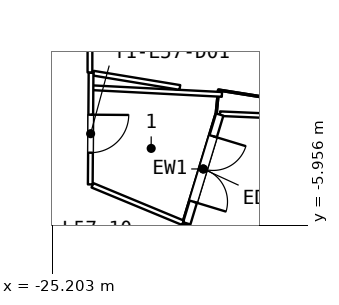
"""IFC4 building model, lengths in metres.
Left out: names, types, materials, properties, quantities, classifications, styles, units other than length and angle.
Written with IfcOpenShell. Run it as: python <this file> out.ifc"""

import sys

from ifc_helpers import new_model, si_unit, direction, frame, frame_2d, origin, place, context, subcontext, project, spatial, rectangle, extrude, element, fill, save


model = new_model("IFC4")
c1 = context("Model", 3, precision=1e-05, world=origin(), true_north=direction((0.0, 1.0)))
c2 = subcontext(c1, "Body", "Model", "MODEL_VIEW")
j1 = project(units=[si_unit("LENGTHUNIT", "METRE"), si_unit("PLANEANGLEUNIT", "RADIAN")], contexts=[c1])
p1 = place(None, origin())
s1 = spatial("IfcSite", under=j1, at=p1, CompositionType="ELEMENT")
p2 = place(p1, origin())
s2 = spatial("IfcBuilding", under=s1, at=p2, CompositionType="ELEMENT")
p3 = place(p2, frame((0.0, 0.0, 240.6)))
s3 = spatial("IfcBuildingStorey", under=s2, at=p3, CompositionType="ELEMENT", Elevation=240.6)
p4 = place(p3, frame((-20.795, -3.05, 0.0), z_axis=(0.0, 0.0, 1.0), x_axis=(-0.290222640036, -0.956959152321, 0.0)))
e1 = element("IfcWall", 1, at=p4, inside=s3, PredefinedType="SOLIDWALL", context=c2, shape_type="SweptSolid", body=[
    extrude(rectangle(XDim=2.99, YDim=0.2, at=frame_2d((1.495, 0.0))), origin(), (0.0, 0.0, 1.0), 7.5),
])
p5 = place(p4, frame((0.595, 0.0, 0.0)))
e2 = element("IfcOpeningElement", 2, at=p5, cuts=e1, PredefinedType="OPENING", context=c2, shape_type="SweptSolid", body=[
    extrude(rectangle(XDim=1.8, YDim=2.4, at=frame_2d((0.9, 1.2))), frame((0.0, 0.11, 0.0), z_axis=(0.0, -1.0, 0.0), x_axis=(1.0, 0.0, 0.0)), (0.0, 0.0, 1.0), 0.22),
])
p6 = place(p3, frame((-21.763, -5.897, 0.0), z_axis=(0.0, 0.0, 1.0), x_axis=(-0.923865536241, 0.382717220603, 0.0)))
e3 = element("IfcWall", 3, at=p6, inside=s3, PredefinedType="PARTITIONING", context=c2, shape_type="SweptSolid", body=[
    extrude(rectangle(XDim=2.576, YDim=0.125, at=frame_2d((1.288, 0.0))), origin(), (0.0, 0.0, 1.0), 2.4),
])
p7 = place(p3, frame((-20.738, -2.519, 0.0), z_axis=(0.0, 0.0, 1.0), x_axis=(-0.99869028618, 0.051163583637, 0.0)))
e4 = element("IfcWall", 4, at=p7, inside=s3, PredefinedType="PARTITIONING", context=c2, shape_type="SweptSolid", body=[
    extrude(rectangle(XDim=3.417, YDim=0.125, at=frame_2d((1.708, 0.0))), origin(), (0.0, 0.0, 1.0), 3.6),
])
p8 = place(p3, frame((-21.844, -2.336, 0.0), z_axis=(0.0, 0.0, 1.0), x_axis=(-0.986650274998, 0.162853415212, 0.0)))
e5 = element("IfcWall", 5, at=p8, inside=s3, PredefinedType="PARTITIONING", context=c2, shape_type="SweptSolid", body=[
    extrude(rectangle(XDim=2.306, YDim=0.125, at=frame_2d((1.153, 0.0))), origin(), (0.0, 0.0, 1.0), 3.6),
])
p9 = place(p3, frame((-24.181, -1.95, 0.0), z_axis=(0.0, 0.0, 1.0), x_axis=(-0.007066667577, -0.999975030793, 0.0)))
e6 = element("IfcWall", 6, at=p9, inside=s3, PredefinedType="PARTITIONING", context=c2, shape_type="SweptSolid", body=[
    extrude(rectangle(XDim=2.937, YDim=0.125, at=frame_2d((1.468, 0.0))), origin(), (0.0, 0.0, 1.0), 2.4),
])
p10 = place(p9, frame((1.102, 0.0, 0.0)))
e7 = element("IfcOpeningElement", 7, at=p10, cuts=e6, PredefinedType="OPENING", context=c2, shape_type="SweptSolid", body=[
    extrude(rectangle(XDim=1.0, YDim=2.1, at=frame_2d((0.5, 1.05))), frame((0.0, 0.073, 0.0), z_axis=(0.0, -1.0, 0.0), x_axis=(1.0, 0.0, 0.0)), (0.0, 0.0, 1.0), 0.145),
])
p11 = place(p3, frame((-24.201, 4.887, 0.0), z_axis=(0.0, 0.0, 1.0), x_axis=(-0.001358888747, -0.99999907671, 0.0)))
e8 = element("IfcWall", 8, at=p11, inside=s3, PredefinedType="PARTITIONING", context=c2, shape_type="SweptSolid", body=[
    extrude(rectangle(XDim=6.827, YDim=0.125, at=frame_2d((3.414, 0.0))), origin(), (0.0, 0.0, 1.0), 2.4),
])
p12 = place(p11, frame((2.614, 0.0, 0.0)))
e9 = element("IfcOpeningElement", 9, at=p12, cuts=e8, PredefinedType="OPENING", context=c2, shape_type="SweptSolid", body=[
    extrude(rectangle(XDim=1.8, YDim=2.1, at=frame_2d((0.9, 1.05))), frame((0.0, 0.073, 0.0), z_axis=(0.0, -1.0, 0.0), x_axis=(1.0, 0.0, 0.0)), (0.0, 0.0, 1.0), 0.145),
])
p13 = place(p5, origin())
e10 = element("IfcDoor", 10, at=p13, inside=s3, OperationType="SINGLE_SWING_LEFT", PredefinedType="DOOR", context=c2, shape_type="SweptSolid", body=[
    extrude(rectangle(XDim=1.8, YDim=2.4, at=frame_2d((0.9, 1.2))), frame((0.0, 0.025, 0.0), z_axis=(0.0, -1.0, 0.0), x_axis=(1.0, 0.0, 0.0)), (0.0, 0.0, 1.0), 0.05),
])
fill(e2, e10)
p14 = place(p10, origin())
e11 = element("IfcDoor", 11, at=p14, inside=s3, OperationType="SINGLE_SWING_LEFT", PredefinedType="DOOR", context=c2, shape_type="SweptSolid", body=[
    extrude(rectangle(XDim=1.0, YDim=2.1, at=frame_2d((0.5, 1.05))), frame((0.0, 0.025, 0.0), z_axis=(0.0, -1.0, 0.0), x_axis=(1.0, 0.0, 0.0)), (0.0, 0.0, 1.0), 0.05),
])
fill(e7, e11)
save(model, sys.argv[1])
